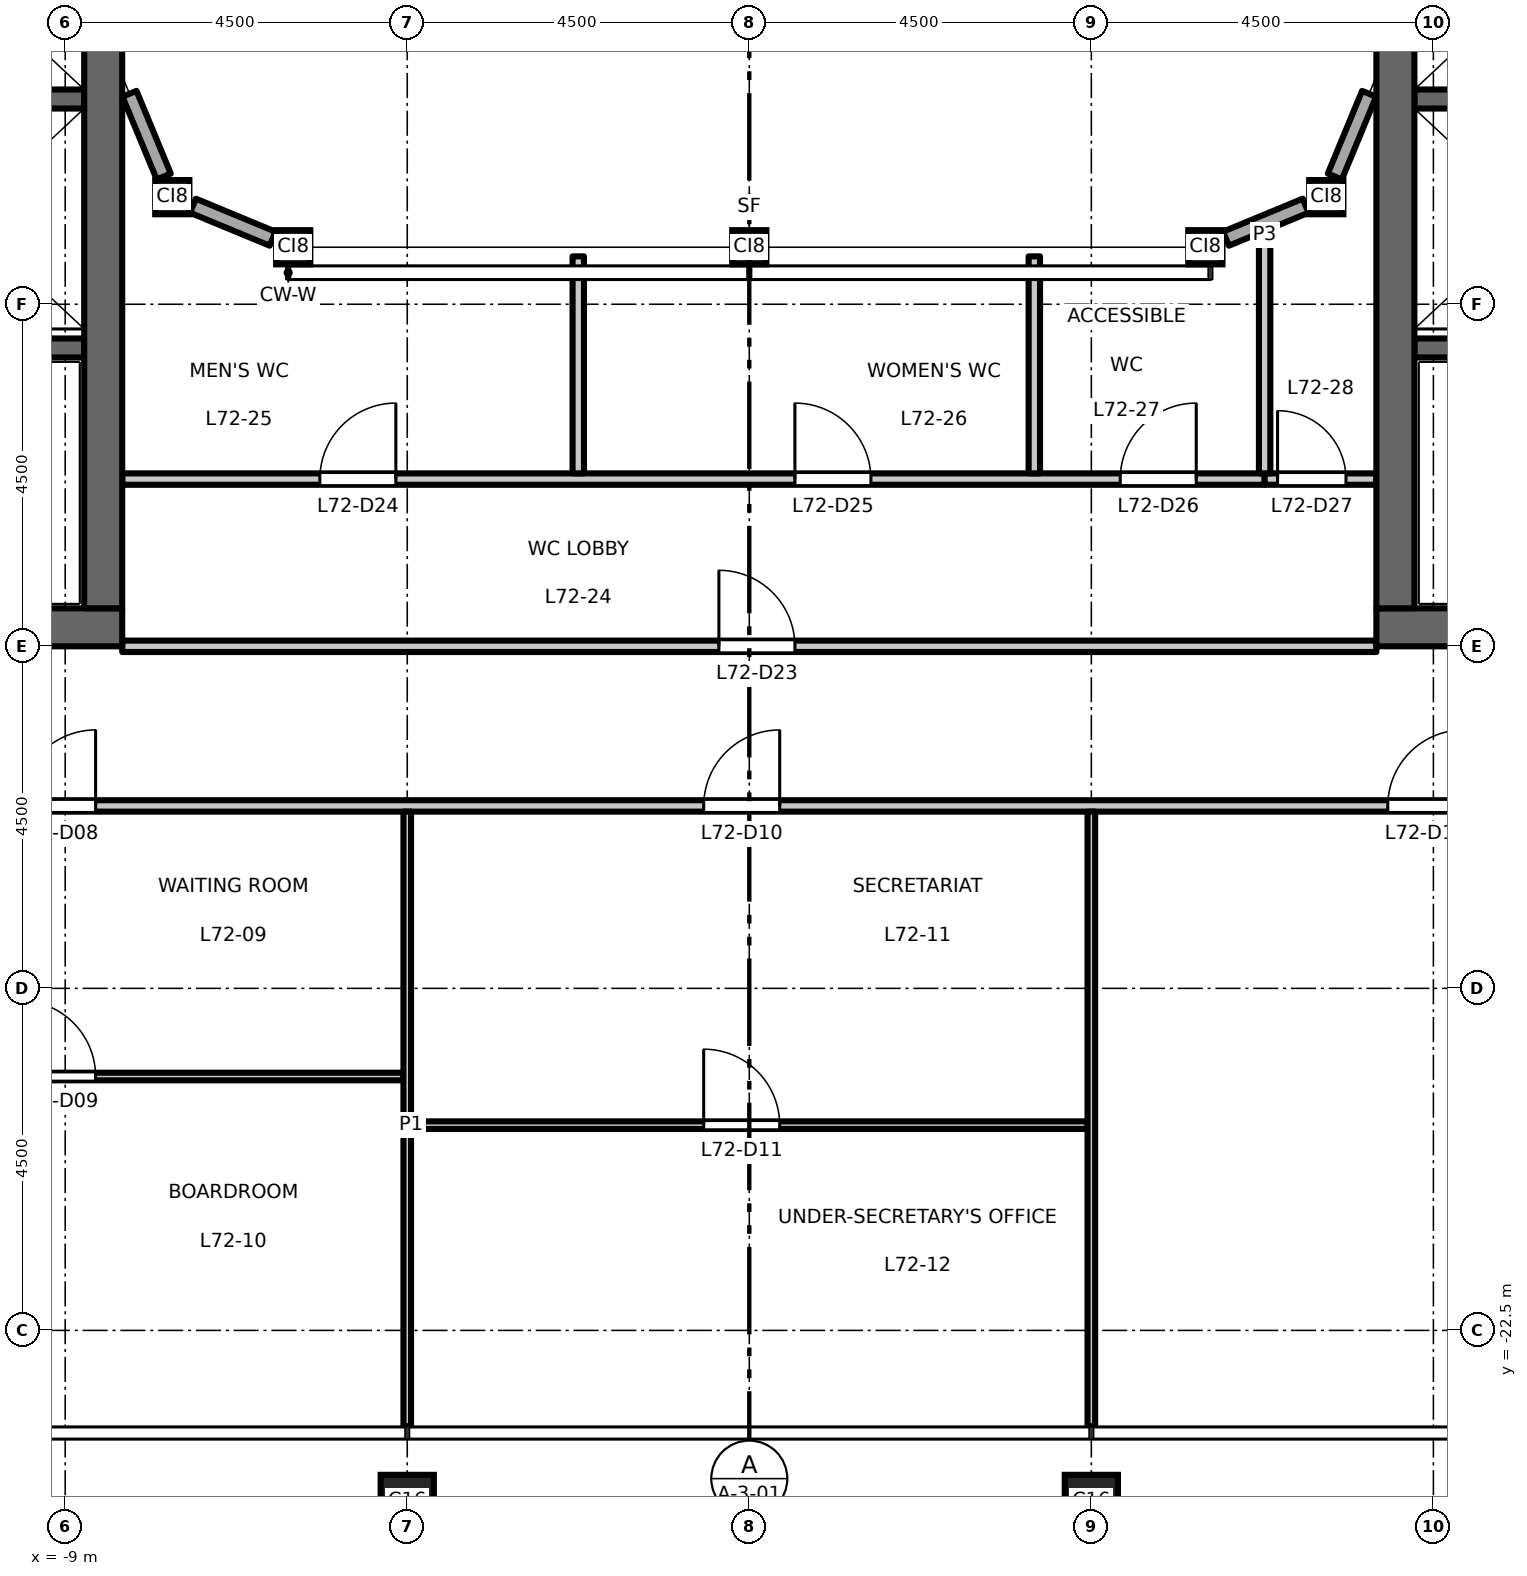
"""IFC4 building model, lengths in metres.
Left out: names, types, materials, properties, quantities, classifications, styles, units other than length and angle.
Written with IfcOpenShell. Run it as: python <this file> out.ifc"""

import sys

from ifc_helpers import new_model, si_unit, direction, frame, frame_2d, origin, origin_2d, place, context, subcontext, project, spatial, rectangle, hollow_rectangle, extrude, element, fill, save


model = new_model("IFC4")
c1 = context("Model", 3, precision=1e-05, world=origin(), true_north=direction((0.0, 1.0)))
c2 = subcontext(c1, "Body", "Model", "MODEL_VIEW")
j1 = project(units=[si_unit("LENGTHUNIT", "METRE"), si_unit("PLANEANGLEUNIT", "RADIAN")], contexts=[c1])
p1 = place(None, origin())
s1 = spatial("IfcSite", under=j1, at=p1, CompositionType="ELEMENT")
p2 = place(p1, origin())
s2 = spatial("IfcBuilding", under=s1, at=p2, CompositionType="ELEMENT")
p3 = place(p2, frame((0.0, 0.0, 334.7)))
s3 = spatial("IfcBuildingStorey", under=s2, at=p3, CompositionType="ELEMENT", Elevation=334.7)
for number, where, z_axis, x_axis in (
    (1, (-4.5, -24.75, 0.0), (0.0, 0.0, 1.0), (1.0, 0.0, 0.0)),
    (2, (4.5, -24.75, 0.0), (0.0, 0.0, 1.0), (1.0, 0.0, 0.0)),
):
    element("IfcColumn", number, at=place(p3, frame(where, z_axis=z_axis, x_axis=x_axis)), inside=s3, PredefinedType="COLUMN", context=c2, shape_type="SweptSolid", body=[
        extrude(hollow_rectangle(XDim=0.7, YDim=0.7, WallThickness=0.036, at=origin_2d()), origin(), (0.0, 0.0, 1.0), 4.5),
    ])
for number, where, z_axis, x_axis in (
    (3, (-7.591, -7.591, 0.0), (0.0, 0.0, 1.0), (1.0, 0.0, 0.0)),
    (4, (-6.0, -8.25, 0.0), (0.0, 0.0, 1.0), (1.0, 0.0, 0.0)),
    (5, (0.0, -8.25, 0.0), (0.0, 0.0, 1.0), (1.0, 0.0, 0.0)),
    (6, (6.0, -8.25, 0.0), (0.0, 0.0, 1.0), (1.0, 0.0, 0.0)),
    (7, (7.591, -7.591, 0.0), (0.0, 0.0, 1.0), (1.0, 0.0, 0.0)),
):
    element("IfcColumn", number, at=place(p3, frame(where, z_axis=z_axis, x_axis=x_axis)), inside=s3, PredefinedType="COLUMN", context=c2, shape_type="SweptSolid", body=[
        extrude(hollow_rectangle(XDim=0.45, YDim=0.45, WallThickness=0.022, at=origin_2d()), origin(), (0.0, 0.0, 1.0), 4.5),
    ])
p4 = place(p3, frame((-8.75, -6.3, 0.0), z_axis=(0.0, 0.0, 1.0), x_axis=(-1.0, 0.0, 0.0)))
e8 = element("IfcWall", 8, at=p4, inside=s3, PredefinedType="SHEAR", context=c2, shape_type="SweptSolid", body=[
    extrude(rectangle(XDim=3.1, YDim=0.25, at=frame_2d((1.55, 0.0))), origin(), (0.0, 0.0, 1.0), 4.35),
])
p5 = place(p3, frame((-8.75, -9.575, 0.0), z_axis=(0.0, 0.0, 1.0), x_axis=(-1.0, 0.0, 0.0)))
e9 = element("IfcWall", 9, at=p5, inside=s3, PredefinedType="SHEAR", context=c2, shape_type="SweptSolid", body=[
    extrude(rectangle(XDim=8.0, YDim=0.25, at=frame_2d((4.0, 0.0))), origin(), (0.0, 0.0, 1.0), 4.35),
])
p6 = place(p5, frame((6.65, 0.0, 0.0)))
e10 = element("IfcOpeningElement", 10, at=p6, cuts=e9, PredefinedType="OPENING", context=c2, shape_type="SweptSolid", body=[
    extrude(rectangle(XDim=1.1, YDim=2.1, at=frame_2d((0.55, 1.05))), frame((0.0, 0.135, 0.0), z_axis=(0.0, -1.0, 0.0), x_axis=(1.0, 0.0, 0.0)), (0.0, 0.0, 1.0), 0.27),
])
p7 = place(p3, frame((-8.25, -13.25, 0.0), z_axis=(0.0, 0.0, 1.0), x_axis=(-1.0, 0.0, 0.0)))
e11 = element("IfcWall", 11, at=p7, inside=s3, PredefinedType="SHEAR", context=c2, shape_type="SweptSolid", body=[
    extrude(rectangle(XDim=9.0, YDim=0.5, at=frame_2d((4.5, 0.0))), origin(), (0.0, 0.0, 1.0), 4.35),
])
p8 = place(p3, frame((-8.5, -13.0, 0.0), z_axis=(0.0, 0.0, 1.0), x_axis=(0.0, 1.0, 0.0)))
e12 = element("IfcWall", 12, at=p8, inside=s3, PredefinedType="SHEAR", context=c2, shape_type="SweptSolid", body=[
    extrude(rectangle(XDim=26.0, YDim=0.5, at=frame_2d((13.0, 0.0))), origin(), (0.0, 0.0, 1.0), 4.35),
])
p9 = place(p3, frame((8.75, -6.3, 0.0), z_axis=(0.0, 0.0, 1.0), x_axis=(1.0, 0.0, 0.0)))
e13 = element("IfcWall", 13, at=p9, inside=s3, PredefinedType="SHEAR", context=c2, shape_type="SweptSolid", body=[
    extrude(rectangle(XDim=3.1, YDim=0.25, at=frame_2d((1.55, 0.0))), origin(), (0.0, 0.0, 1.0), 4.35),
])
p10 = place(p3, frame((8.75, -9.575, 0.0), z_axis=(0.0, 0.0, 1.0), x_axis=(1.0, 0.0, 0.0)))
e14 = element("IfcWall", 14, at=p10, inside=s3, PredefinedType="SHEAR", context=c2, shape_type="SweptSolid", body=[
    extrude(rectangle(XDim=8.0, YDim=0.25, at=frame_2d((4.0, 0.0))), origin(), (0.0, 0.0, 1.0), 4.35),
])
p11 = place(p10, frame((6.65, 0.0, 0.0)))
e15 = element("IfcOpeningElement", 15, at=p11, cuts=e14, PredefinedType="OPENING", context=c2, shape_type="SweptSolid", body=[
    extrude(rectangle(XDim=1.1, YDim=2.1, at=frame_2d((0.55, 1.05))), frame((0.0, 0.135, 0.0), z_axis=(0.0, -1.0, 0.0), x_axis=(1.0, 0.0, 0.0)), (0.0, 0.0, 1.0), 0.27),
])
p12 = place(p3, frame((8.25, -13.25, 0.0), z_axis=(0.0, 0.0, 1.0), x_axis=(1.0, 0.0, 0.0)))
e16 = element("IfcWall", 16, at=p12, inside=s3, PredefinedType="SHEAR", context=c2, shape_type="SweptSolid", body=[
    extrude(rectangle(XDim=9.0, YDim=0.5, at=frame_2d((4.5, 0.0))), origin(), (0.0, 0.0, 1.0), 4.35),
])
p13 = place(p3, frame((8.5, -13.0, 0.0), z_axis=(0.0, 0.0, 1.0), x_axis=(0.0, 1.0, 0.0)))
e17 = element("IfcWall", 17, at=p13, inside=s3, PredefinedType="SHEAR", context=c2, shape_type="SweptSolid", body=[
    extrude(rectangle(XDim=26.0, YDim=0.5, at=frame_2d((13.0, 0.0))), origin(), (0.0, 0.0, 1.0), 4.35),
])
p14 = place(p3, frame((6.271, -8.137, 0.0), z_axis=(0.0, 0.0, 1.0), x_axis=(0.923864661962, 0.382719331074, 0.0)))
e18 = element("IfcWall", 18, at=p14, inside=s3, PredefinedType="STANDARD", context=c2, shape_type="SweptSolid", body=[
    extrude(rectangle(XDim=1.134, YDim=0.2, at=frame_2d((0.567, 0.0))), origin(), (0.0, 0.0, 1.0), 4.01),
])
for number, where, z_axis, x_axis in (
    (19, (7.703, -7.319, 0.0), (0.0, 0.0, 1.0), (0.383, 0.924, 0.0)),
    (20, (-8.154, -6.231, 0.0), (0.0, 0.0, 1.0), (0.383, -0.924, 0.0)),
):
    element("IfcWall", number, at=place(p3, frame(where, z_axis=z_axis, x_axis=x_axis)), inside=s3, PredefinedType="STANDARD", context=c2, shape_type="SweptSolid", body=[
        extrude(rectangle(XDim=1.178, YDim=0.2, at=frame_2d((0.589, 0.0))), origin(), (0.0, 0.0, 1.0), 4.01),
    ])
p15 = place(p3, frame((-7.319, -7.703, 0.0), z_axis=(0.0, 0.0, 1.0), x_axis=(0.923864661962, -0.382719331074, 0.0)))
e21 = element("IfcWall", 21, at=p15, inside=s3, PredefinedType="STANDARD", context=c2, shape_type="SweptSolid", body=[
    extrude(rectangle(XDim=1.134, YDim=0.2, at=frame_2d((0.567, 0.0))), origin(), (0.0, 0.0, 1.0), 4.01),
])
p16 = place(p3, frame((-4.45, -19.8, 0.0), z_axis=(0.0, 0.0, 1.0), x_axis=(1.0, 0.0, 0.0)))
e22 = element("IfcWall", 22, at=p16, inside=s3, PredefinedType="PARTITIONING", context=c2, shape_type="SweptSolid", body=[
    extrude(rectangle(XDim=8.9, YDim=0.1, at=frame_2d((4.45, 0.0))), origin(), (0.0, 0.0, 1.0), 4.35),
])
p17 = place(p16, frame((3.85, 0.0, 0.0)))
e23 = element("IfcOpeningElement", 23, at=p17, cuts=e22, PredefinedType="OPENING", context=c2, shape_type="SweptSolid", body=[
    extrude(rectangle(XDim=1.0, YDim=2.1, at=frame_2d((0.5, 1.05))), frame((0.0, 0.06, 0.0), z_axis=(0.0, -1.0, 0.0), x_axis=(1.0, 0.0, 0.0)), (0.0, 0.0, 1.0), 0.12),
])
p18 = place(p3, frame((-13.45, -19.16, 0.0), z_axis=(0.0, 0.0, 1.0), x_axis=(1.0, 0.0, 0.0)))
e24 = element("IfcWall", 24, at=p18, inside=s3, PredefinedType="PARTITIONING", context=c2, shape_type="SweptSolid", body=[
    extrude(rectangle(XDim=8.9, YDim=0.1, at=frame_2d((4.45, 0.0))), origin(), (0.0, 0.0, 1.0), 4.35),
])
p19 = place(p18, frame((3.85, 0.0, 0.0)))
e25 = element("IfcOpeningElement", 25, at=p19, cuts=e24, PredefinedType="OPENING", context=c2, shape_type="SweptSolid", body=[
    extrude(rectangle(XDim=1.0, YDim=2.1, at=frame_2d((0.5, 1.05))), frame((0.0, 0.06, 0.0), z_axis=(0.0, -1.0, 0.0), x_axis=(1.0, 0.0, 0.0)), (0.0, 0.0, 1.0), 0.12),
])
p20 = place(p3, frame((-22.808, -15.6, 0.0), z_axis=(0.0, 0.0, 1.0), x_axis=(1.0, 0.0, 0.0)))
e26 = element("IfcWall", 26, at=p20, inside=s3, PredefinedType="PARTITIONING", context=c2, shape_type="SweptSolid", body=[
    extrude(rectangle(XDim=45.616, YDim=0.15, at=frame_2d((22.808, 0.0))), origin(), (0.0, 0.0, 1.0), 4.35),
])
p21 = place(p20, frame((13.208, 0.0, 0.0)))
e27 = element("IfcOpeningElement", 27, at=p21, cuts=e26, PredefinedType="OPENING", context=c2, shape_type="SweptSolid", body=[
    extrude(rectangle(XDim=1.0, YDim=2.1, at=frame_2d((0.5, 1.05))), frame((0.0, 0.085, 0.0), z_axis=(0.0, -1.0, 0.0), x_axis=(1.0, 0.0, 0.0)), (0.0, 0.0, 1.0), 0.17),
])
p22 = place(p20, frame((22.208, 0.0, 0.0)))
e28 = element("IfcOpeningElement", 28, at=p22, cuts=e26, PredefinedType="OPENING", context=c2, shape_type="SweptSolid", body=[
    extrude(rectangle(XDim=1.0, YDim=2.1, at=frame_2d((0.5, 1.05))), frame((0.0, 0.085, 0.0), z_axis=(0.0, -1.0, 0.0), x_axis=(1.0, 0.0, 0.0)), (0.0, 0.0, 1.0), 0.17),
])
p23 = place(p20, frame((31.208, 0.0, 0.0)))
e29 = element("IfcOpeningElement", 29, at=p23, cuts=e26, PredefinedType="OPENING", context=c2, shape_type="SweptSolid", body=[
    extrude(rectangle(XDim=1.0, YDim=2.1, at=frame_2d((0.5, 1.05))), frame((0.0, 0.085, 0.0), z_axis=(0.0, -1.0, 0.0), x_axis=(1.0, 0.0, 0.0)), (0.0, 0.0, 1.0), 0.17),
])
p24 = place(p20, frame((4.15, 0.0, 0.0)))
e30 = element("IfcOpeningElement", 30, at=p24, cuts=e26, PredefinedType="OPENING", context=c2, shape_type="SweptSolid", body=[
    extrude(rectangle(XDim=1.0, YDim=2.1, at=frame_2d((0.5, 1.05))), frame((0.0, 0.085, 0.0), z_axis=(0.0, -1.0, 0.0), x_axis=(1.0, 0.0, 0.0)), (0.0, 0.0, 1.0), 0.17),
])
p25 = place(p20, frame((40.458, 0.0, 0.0)))
e31 = element("IfcOpeningElement", 31, at=p25, cuts=e26, PredefinedType="OPENING", context=c2, shape_type="SweptSolid", body=[
    extrude(rectangle(XDim=1.0, YDim=2.1, at=frame_2d((0.5, 1.05))), frame((0.0, 0.085, 0.0), z_axis=(0.0, -1.0, 0.0), x_axis=(1.0, 0.0, 0.0)), (0.0, 0.0, 1.0), 0.17),
])
p26 = place(p3, frame((-8.25, -13.5, 0.0), z_axis=(0.0, 0.0, 1.0), x_axis=(1.0, 0.0, 0.0)))
e32 = element("IfcWall", 32, at=p26, inside=s3, PredefinedType="PARTITIONING", context=c2, shape_type="SweptSolid", body=[
    extrude(rectangle(XDim=16.5, YDim=0.15, at=frame_2d((8.25, 0.0))), origin(), (0.0, 0.0, 1.0), 4.35),
])
p27 = place(p26, frame((7.85, 0.0, 0.0)))
e33 = element("IfcOpeningElement", 33, at=p27, cuts=e32, PredefinedType="OPENING", context=c2, shape_type="SweptSolid", body=[
    extrude(rectangle(XDim=1.0, YDim=2.1, at=frame_2d((0.5, 1.05))), frame((0.0, 0.085, 0.0), z_axis=(0.0, -1.0, 0.0), x_axis=(1.0, 0.0, 0.0)), (0.0, 0.0, 1.0), 0.17),
])
p28 = place(p3, frame((-8.25, -11.3, 0.0), z_axis=(0.0, 0.0, 1.0), x_axis=(1.0, 0.0, 0.0)))
e34 = element("IfcWall", 34, at=p28, inside=s3, PredefinedType="PARTITIONING", context=c2, shape_type="SweptSolid", body=[
    extrude(rectangle(XDim=15.03, YDim=0.15, at=frame_2d((7.515, 0.0))), origin(), (0.0, 0.0, 1.0), 4.35),
])
p29 = place(p28, frame((2.6, 0.0, 0.0)))
e35 = element("IfcOpeningElement", 35, at=p29, cuts=e34, PredefinedType="OPENING", context=c2, shape_type="SweptSolid", body=[
    extrude(rectangle(XDim=1.0, YDim=2.1, at=frame_2d((0.5, 1.05))), frame((0.0, 0.085, 0.0), z_axis=(0.0, -1.0, 0.0), x_axis=(1.0, 0.0, 0.0)), (0.0, 0.0, 1.0), 0.17),
])
p30 = place(p28, frame((8.85, 0.0, 0.0)))
e36 = element("IfcOpeningElement", 36, at=p30, cuts=e34, PredefinedType="OPENING", context=c2, shape_type="SweptSolid", body=[
    extrude(rectangle(XDim=1.0, YDim=2.1, at=frame_2d((0.5, 1.05))), frame((0.0, 0.085, 0.0), z_axis=(0.0, -1.0, 0.0), x_axis=(1.0, 0.0, 0.0)), (0.0, 0.0, 1.0), 0.17),
])
p31 = place(p28, frame((13.13, 0.0, 0.0)))
e37 = element("IfcOpeningElement", 37, at=p31, cuts=e34, PredefinedType="OPENING", context=c2, shape_type="SweptSolid", body=[
    extrude(rectangle(XDim=1.0, YDim=2.1, at=frame_2d((0.5, 1.05))), frame((0.0, 0.085, 0.0), z_axis=(0.0, -1.0, 0.0), x_axis=(1.0, 0.0, 0.0)), (0.0, 0.0, 1.0), 0.17),
])
p32 = place(p3, frame((6.78, -11.3, 0.0), z_axis=(0.0, 0.0, 1.0), x_axis=(1.0, 0.0, 0.0)))
e38 = element("IfcWall", 38, at=p32, inside=s3, PredefinedType="PARTITIONING", context=c2, shape_type="SweptSolid", body=[
    extrude(rectangle(XDim=1.47, YDim=0.15, at=frame_2d((0.735, 0.0))), origin(), (0.0, 0.0, 1.0), 4.35),
])
p33 = place(p32, frame((0.17, 0.0, 0.0)))
e39 = element("IfcOpeningElement", 39, at=p33, cuts=e38, PredefinedType="OPENING", context=c2, shape_type="SweptSolid", body=[
    extrude(rectangle(XDim=0.9, YDim=2.1, at=frame_2d((0.45, 1.05))), frame((0.0, 0.085, 0.0), z_axis=(0.0, -1.0, 0.0), x_axis=(1.0, 0.0, 0.0)), (0.0, 0.0, 1.0), 0.17),
])
p34 = place(p3, frame((-4.5, -23.76, 0.0), z_axis=(0.0, 0.0, 1.0), x_axis=(0.0, 1.0, 0.0)))
e40 = element("IfcWall", 40, at=p34, inside=s3, PredefinedType="PARTITIONING", context=c2, shape_type="SweptSolid", body=[
    extrude(rectangle(XDim=8.085, YDim=0.1, at=frame_2d((4.042, 0.0))), origin(), (0.0, 0.0, 1.0), 3.65),
])
for number, where, z_axis, x_axis in (
    (41, (-2.25, -11.225, 0.0), (0.0, 0.0, 1.0), (0.0, 1.0, 0.0)),
    (42, (3.75, -11.225, 0.0), (0.0, 0.0, 1.0), (0.0, 1.0, 0.0)),
):
    element("IfcWall", number, at=place(p3, frame(where, z_axis=z_axis, x_axis=x_axis)), inside=s3, PredefinedType="PARTITIONING", context=c2, shape_type="SweptSolid", body=[
        extrude(rectangle(XDim=2.855, YDim=0.15, at=frame_2d((1.427, 0.0))), origin(), (0.0, 0.0, 1.0), 4.35),
    ])
p35 = place(p3, frame((4.5, -23.76, 0.0), z_axis=(0.0, 0.0, 1.0), x_axis=(0.0, 1.0, 0.0)))
e43 = element("IfcWall", 43, at=p35, inside=s3, PredefinedType="PARTITIONING", context=c2, shape_type="SweptSolid", body=[
    extrude(rectangle(XDim=8.085, YDim=0.1, at=frame_2d((4.042, 0.0))), origin(), (0.0, 0.0, 1.0), 3.65),
])
p36 = place(p3, frame((6.78, -11.225, 0.0), z_axis=(0.0, 0.0, 1.0), x_axis=(0.0, 1.0, 0.0)))
e44 = element("IfcWall", 44, at=p36, inside=s3, PredefinedType="PARTITIONING", context=c2, shape_type="SweptSolid", body=[
    extrude(rectangle(XDim=3.138, YDim=0.15, at=frame_2d((1.569, 0.0))), origin(), (0.0, 0.0, 1.0), 4.35),
])
p37 = place(p21, origin())
e45 = element("IfcDoor", 45, at=p37, inside=s3, OperationType="SINGLE_SWING_RIGHT", PredefinedType="DOOR", context=c2, shape_type="SweptSolid", body=[
    extrude(rectangle(XDim=1.0, YDim=2.1, at=frame_2d((0.5, 1.05))), frame((0.0, 0.025, 0.0), z_axis=(0.0, -1.0, 0.0), x_axis=(1.0, 0.0, 0.0)), (0.0, 0.0, 1.0), 0.05),
])
fill(e27, e45)
p38 = place(p19, origin())
e46 = element("IfcDoor", 46, at=p38, inside=s3, OperationType="SINGLE_SWING_LEFT", PredefinedType="DOOR", context=c2, shape_type="SweptSolid", body=[
    extrude(rectangle(XDim=1.0, YDim=2.1, at=frame_2d((0.5, 1.05))), frame((0.0, 0.025, 0.0), z_axis=(0.0, -1.0, 0.0), x_axis=(1.0, 0.0, 0.0)), (0.0, 0.0, 1.0), 0.05),
])
fill(e25, e46)
p39 = place(p22, origin())
e47 = element("IfcDoor", 47, at=p39, inside=s3, OperationType="SINGLE_SWING_RIGHT", PredefinedType="DOOR", context=c2, shape_type="SweptSolid", body=[
    extrude(rectangle(XDim=1.0, YDim=2.1, at=frame_2d((0.5, 1.05))), frame((0.0, 0.025, 0.0), z_axis=(0.0, -1.0, 0.0), x_axis=(1.0, 0.0, 0.0)), (0.0, 0.0, 1.0), 0.05),
])
fill(e28, e47)
p40 = place(p17, origin())
e48 = element("IfcDoor", 48, at=p40, inside=s3, OperationType="SINGLE_SWING_LEFT", PredefinedType="DOOR", context=c2, shape_type="SweptSolid", body=[
    extrude(rectangle(XDim=1.0, YDim=2.1, at=frame_2d((0.5, 1.05))), frame((0.0, 0.025, 0.0), z_axis=(0.0, -1.0, 0.0), x_axis=(1.0, 0.0, 0.0)), (0.0, 0.0, 1.0), 0.05),
])
fill(e23, e48)
p41 = place(p23, origin())
e49 = element("IfcDoor", 49, at=p41, inside=s3, OperationType="SINGLE_SWING_RIGHT", PredefinedType="DOOR", context=c2, shape_type="SweptSolid", body=[
    extrude(rectangle(XDim=1.0, YDim=2.1, at=frame_2d((0.5, 1.05))), frame((0.0, 0.025, 0.0), z_axis=(0.0, -1.0, 0.0), x_axis=(1.0, 0.0, 0.0)), (0.0, 0.0, 1.0), 0.05),
])
fill(e29, e49)
p42 = place(p27, origin())
e50 = element("IfcDoor", 50, at=p42, inside=s3, OperationType="SINGLE_SWING_LEFT", PredefinedType="DOOR", context=c2, shape_type="SweptSolid", body=[
    extrude(rectangle(XDim=1.0, YDim=2.1, at=frame_2d((0.5, 1.05))), frame((0.0, 0.025, 0.0), z_axis=(0.0, -1.0, 0.0), x_axis=(1.0, 0.0, 0.0)), (0.0, 0.0, 1.0), 0.05),
])
fill(e33, e50)
p43 = place(p29, origin())
e51 = element("IfcDoor", 51, at=p43, inside=s3, OperationType="SINGLE_SWING_RIGHT", PredefinedType="DOOR", context=c2, shape_type="SweptSolid", body=[
    extrude(rectangle(XDim=1.0, YDim=2.1, at=frame_2d((0.5, 1.05))), frame((0.0, 0.025, 0.0), z_axis=(0.0, -1.0, 0.0), x_axis=(1.0, 0.0, 0.0)), (0.0, 0.0, 1.0), 0.05),
])
fill(e35, e51)
p44 = place(p30, origin())
e52 = element("IfcDoor", 52, at=p44, inside=s3, OperationType="SINGLE_SWING_LEFT", PredefinedType="DOOR", context=c2, shape_type="SweptSolid", body=[
    extrude(rectangle(XDim=1.0, YDim=2.1, at=frame_2d((0.5, 1.05))), frame((0.0, 0.025, 0.0), z_axis=(0.0, -1.0, 0.0), x_axis=(1.0, 0.0, 0.0)), (0.0, 0.0, 1.0), 0.05),
])
fill(e36, e52)
p45 = place(p31, origin())
e53 = element("IfcDoor", 53, at=p45, inside=s3, OperationType="SINGLE_SWING_RIGHT", PredefinedType="DOOR", context=c2, shape_type="SweptSolid", body=[
    extrude(rectangle(XDim=1.0, YDim=2.1, at=frame_2d((0.5, 1.05))), frame((0.0, 0.025, 0.0), z_axis=(0.0, -1.0, 0.0), x_axis=(1.0, 0.0, 0.0)), (0.0, 0.0, 1.0), 0.05),
])
fill(e37, e53)
p46 = place(p33, origin())
e54 = element("IfcDoor", 54, at=p46, inside=s3, OperationType="SINGLE_SWING_LEFT", PredefinedType="DOOR", context=c2, shape_type="SweptSolid", body=[
    extrude(rectangle(XDim=0.9, YDim=2.1, at=frame_2d((0.45, 1.05))), frame((0.0, 0.025, 0.0), z_axis=(0.0, -1.0, 0.0), x_axis=(1.0, 0.0, 0.0)), (0.0, 0.0, 1.0), 0.05),
])
fill(e39, e54)
save(model, sys.argv[1])
